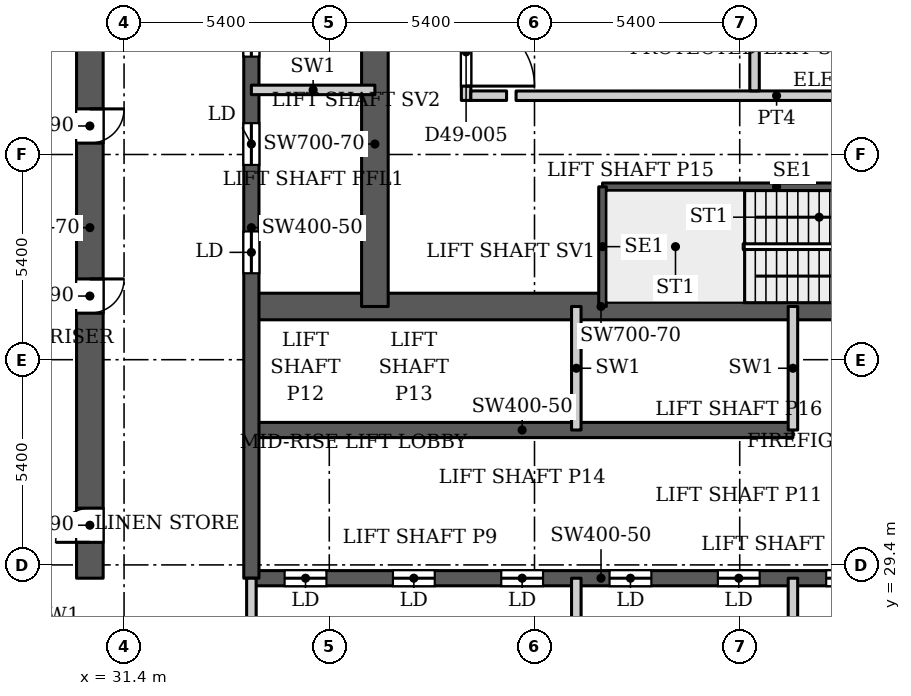
"""IFC4 building model, lengths in metres.
Left out: names, types, materials, properties, quantities, classifications, styles, units other than length and angle.
Written with IfcOpenShell. Run it as: python <this file> out.ifc"""

import sys

from ifc_helpers import new_model, si_unit, direction, frame, frame_2d, origin, place, context, subcontext, project, spatial, rectangle, extrude, source, transform, mapped, element, fill, save


model = new_model("IFC4")
c1 = context("Model", 3, precision=1e-05, world=origin(), true_north=direction((0.0, 1.0)))
c2 = subcontext(c1, "Body", "Model", "MODEL_VIEW")
j1 = project(units=[si_unit("LENGTHUNIT", "METRE"), si_unit("PLANEANGLEUNIT", "RADIAN")], contexts=[c1])
p1 = place(None, origin())
s1 = spatial("IfcSite", under=j1, at=p1, CompositionType="ELEMENT")
p2 = place(p1, origin())
s2 = spatial("IfcBuilding", under=s1, at=p2, CompositionType="ELEMENT")
p3 = place(p2, frame((0.0, 0.0, 211.1)))
s3 = spatial("IfcBuildingStorey", under=s2, at=p3, CompositionType="ELEMENT", Elevation=211.1)
p4 = place(p3, frame((34.75, 29.05, 0.0), z_axis=(0.0, 0.0, 1.0), x_axis=(1.0, 0.0, 0.0)))
e1 = element("IfcWall", 1, at=p4, inside=s3, PredefinedType="SHEAR", context=c2, shape_type="SweptSolid", body=[
    extrude(rectangle(XDim=18.4, YDim=0.4, at=frame_2d((9.2, 0.0))), origin(), (0.0, 0.0, 1.0), 5.1),
])
p5 = place(p4, frame((0.875, 0.0, 0.0)))
e2 = element("IfcOpeningElement", 2, at=p5, cuts=e1, PredefinedType="OPENING", context=c2, shape_type="SweptSolid", body=[
    extrude(rectangle(XDim=1.1, YDim=2.2, at=frame_2d((0.55, 1.1))), frame((0.0, 0.21, 0.0), z_axis=(0.0, -1.0, 0.0), x_axis=(1.0, 0.0, 0.0)), (0.0, 0.0, 1.0), 0.42),
])
p6 = place(p4, frame((3.725, 0.0, 0.0)))
e3 = element("IfcOpeningElement", 3, at=p6, cuts=e1, PredefinedType="OPENING", context=c2, shape_type="SweptSolid", body=[
    extrude(rectangle(XDim=1.1, YDim=2.2, at=frame_2d((0.55, 1.1))), frame((0.0, 0.21, 0.0), z_axis=(0.0, -1.0, 0.0), x_axis=(1.0, 0.0, 0.0)), (0.0, 0.0, 1.0), 0.42),
])
p7 = place(p4, frame((6.575, 0.0, 0.0)))
e4 = element("IfcOpeningElement", 4, at=p7, cuts=e1, PredefinedType="OPENING", context=c2, shape_type="SweptSolid", body=[
    extrude(rectangle(XDim=1.1, YDim=2.2, at=frame_2d((0.55, 1.1))), frame((0.0, 0.21, 0.0), z_axis=(0.0, -1.0, 0.0), x_axis=(1.0, 0.0, 0.0)), (0.0, 0.0, 1.0), 0.42),
])
p8 = place(p4, frame((9.425, 0.0, 0.0)))
e5 = element("IfcOpeningElement", 5, at=p8, cuts=e1, PredefinedType="OPENING", context=c2, shape_type="SweptSolid", body=[
    extrude(rectangle(XDim=1.1, YDim=2.2, at=frame_2d((0.55, 1.1))), frame((0.0, 0.21, 0.0), z_axis=(0.0, -1.0, 0.0), x_axis=(1.0, 0.0, 0.0)), (0.0, 0.0, 1.0), 0.42),
])
p9 = place(p4, frame((12.275, 0.0, 0.0)))
e6 = element("IfcOpeningElement", 6, at=p9, cuts=e1, PredefinedType="OPENING", context=c2, shape_type="SweptSolid", body=[
    extrude(rectangle(XDim=1.1, YDim=2.2, at=frame_2d((0.55, 1.1))), frame((0.0, 0.21, 0.0), z_axis=(0.0, -1.0, 0.0), x_axis=(1.0, 0.0, 0.0)), (0.0, 0.0, 1.0), 0.42),
])
p10 = place(p4, frame((15.125, 0.0, 0.0)))
e7 = element("IfcOpeningElement", 7, at=p10, cuts=e1, PredefinedType="OPENING", context=c2, shape_type="SweptSolid", body=[
    extrude(rectangle(XDim=1.1, YDim=2.2, at=frame_2d((0.55, 1.1))), frame((0.0, 0.21, 0.0), z_axis=(0.0, -1.0, 0.0), x_axis=(1.0, 0.0, 0.0)), (0.0, 0.0, 1.0), 0.42),
])
p11 = place(p3, frame((34.75, 32.95, 0.0), z_axis=(0.0, 0.0, 1.0), x_axis=(1.0, 0.0, 0.0)))
e8 = element("IfcWall", 8, at=p11, inside=s3, PredefinedType="SHEAR", context=c2, shape_type="SweptSolid", body=[
    extrude(rectangle(XDim=14.25, YDim=0.4, at=frame_2d((7.125, 0.0))), origin(), (0.0, 0.0, 1.0), 5.1),
])
p12 = place(p3, frame((34.75, 36.2, 0.0), z_axis=(0.0, 0.0, 1.0), x_axis=(1.0, 0.0, 0.0)))
e9 = element("IfcWall", 9, at=p12, inside=s3, PredefinedType="SHEAR", context=c2, shape_type="SweptSolid", body=[
    extrude(rectangle(XDim=18.4, YDim=0.7, at=frame_2d((9.2, 0.0))), origin(), (0.0, 0.0, 1.0), 5.1),
])
p13 = place(p12, frame((16.9, 0.0, 0.0)))
e10 = element("IfcOpeningElement", 10, at=p13, cuts=e9, PredefinedType="OPENING", context=c2, shape_type="SweptSolid", body=[
    extrude(rectangle(XDim=1.0, YDim=2.2, at=frame_2d((0.5, 1.1))), frame((0.0, 0.36, 0.0), z_axis=(0.0, -1.0, 0.0), x_axis=(1.0, 0.0, 0.0)), (0.0, 0.0, 1.0), 0.72),
])
p14 = place(p3, frame((34.75, 29.05, 0.0), z_axis=(0.0, 0.0, 1.0), x_axis=(0.0, 1.0, 0.0)))
e11 = element("IfcWall", 11, at=p14, inside=s3, PredefinedType="SHEAR", context=c2, shape_type="SweptSolid", body=[
    extrude(rectangle(XDim=18.45, YDim=0.4, at=frame_2d((9.225, 0.0))), origin(), (0.0, 0.0, 1.0), 5.1),
])
p15 = place(p14, frame((8.025, 0.0, 0.0)))
e12 = element("IfcOpeningElement", 12, at=p15, cuts=e11, PredefinedType="OPENING", context=c2, shape_type="SweptSolid", body=[
    extrude(rectangle(XDim=1.1, YDim=2.2, at=frame_2d((0.55, 1.1))), frame((0.0, 0.21, 0.0), z_axis=(0.0, -1.0, 0.0), x_axis=(1.0, 0.0, 0.0)), (0.0, 0.0, 1.0), 0.42),
])
p16 = place(p14, frame((10.875, 0.0, 0.0)))
e13 = element("IfcOpeningElement", 13, at=p16, cuts=e11, PredefinedType="OPENING", context=c2, shape_type="SweptSolid", body=[
    extrude(rectangle(XDim=1.1, YDim=2.2, at=frame_2d((0.55, 1.1))), frame((0.0, 0.21, 0.0), z_axis=(0.0, -1.0, 0.0), x_axis=(1.0, 0.0, 0.0)), (0.0, 0.0, 1.0), 0.42),
])
p17 = place(p14, frame((13.725, 0.0, 0.0)))
e14 = element("IfcOpeningElement", 14, at=p17, cuts=e11, PredefinedType="OPENING", context=c2, shape_type="SweptSolid", body=[
    extrude(rectangle(XDim=1.1, YDim=2.2, at=frame_2d((0.55, 1.1))), frame((0.0, 0.21, 0.0), z_axis=(0.0, -1.0, 0.0), x_axis=(1.0, 0.0, 0.0)), (0.0, 0.0, 1.0), 0.42),
])
p18 = place(p14, frame((15.95, 0.0, 0.0)))
e15 = element("IfcOpeningElement", 15, at=p18, cuts=e11, PredefinedType="OPENING", context=c2, shape_type="SweptSolid", body=[
    extrude(rectangle(XDim=1.1, YDim=2.2, at=frame_2d((0.55, 1.1))), frame((0.0, 0.21, 0.0), z_axis=(0.0, -1.0, 0.0), x_axis=(1.0, 0.0, 0.0)), (0.0, 0.0, 1.0), 0.42),
])
p19 = place(p3, frame((38.0, 36.2, 0.0), z_axis=(0.0, 0.0, 1.0), x_axis=(0.0, 1.0, 0.0)))
e16 = element("IfcWall", 16, at=p19, inside=s3, PredefinedType="SHEAR", context=c2, shape_type="SweptSolid", body=[
    extrude(rectangle(XDim=8.55, YDim=0.7, at=frame_2d((4.275, 0.0))), origin(), (0.0, 0.0, 1.0), 5.1),
])
p20 = place(p3, frame((30.5, 29.05, 0.0), z_axis=(0.0, 0.0, 1.0), x_axis=(0.0, 1.0, 0.0)))
e17 = element("IfcWall", 17, at=p20, inside=s3, PredefinedType="SHEAR", context=c2, shape_type="SweptSolid", body=[
    extrude(rectangle(XDim=18.45, YDim=0.7, at=frame_2d((9.225, 0.0))), origin(), (0.0, 0.0, 1.0), 5.1),
])
p21 = place(p20, frame((0.944, 0.0, 0.0)))
e18 = element("IfcOpeningElement", 18, at=p21, cuts=e17, PredefinedType="OPENING", context=c2, shape_type="SweptSolid", body=[
    extrude(rectangle(XDim=0.9, YDim=2.2, at=frame_2d((0.45, 1.1))), frame((0.0, 0.36, 0.0), z_axis=(0.0, -1.0, 0.0), x_axis=(1.0, 0.0, 0.0)), (0.0, 0.0, 1.0), 0.72),
])
p22 = place(p20, frame((6.975, 0.0, 0.0)))
e19 = element("IfcOpeningElement", 19, at=p22, cuts=e17, PredefinedType="OPENING", context=c2, shape_type="SweptSolid", body=[
    extrude(rectangle(XDim=0.9, YDim=2.2, at=frame_2d((0.45, 1.1))), frame((0.0, 0.36, 0.0), z_axis=(0.0, -1.0, 0.0), x_axis=(1.0, 0.0, 0.0)), (0.0, 0.0, 1.0), 0.72),
])
p23 = place(p20, frame((11.45, 0.0, 0.0)))
e20 = element("IfcOpeningElement", 20, at=p23, cuts=e17, PredefinedType="OPENING", context=c2, shape_type="SweptSolid", body=[
    extrude(rectangle(XDim=0.9, YDim=2.2, at=frame_2d((0.45, 1.1))), frame((0.0, 0.36, 0.0), z_axis=(0.0, -1.0, 0.0), x_axis=(1.0, 0.0, 0.0)), (0.0, 0.0, 1.0), 0.72),
])
p24 = place(p3, frame((29.712, 26.072, 0.0), z_axis=(0.0, 0.0, 1.0), x_axis=(-0.511028049012, 0.859564036662, 0.0)))
e21 = element("IfcWall", 21, at=p24, inside=s3, PredefinedType="SOLIDWALL", context=c2, shape_type="SweptSolid", body=[
    extrude(rectangle(XDim=4.634, YDim=0.25, at=frame_2d((2.317, 0.0))), origin(), (0.0, 0.0, 1.0), 4.417),
])
p25 = place(p3, frame((27.195, 31.969, 0.0), z_axis=(0.0, 0.0, 1.0), x_axis=(0.052556141556, 0.99861797099, 0.0)))
e22 = element("IfcWall", 22, at=p25, inside=s3, PredefinedType="SOLIDWALL", context=c2, shape_type="SweptSolid", body=[
    extrude(rectangle(XDim=66.651, YDim=0.25, at=frame_2d((33.326, 0.0))), origin(), (0.0, 0.0, 1.0), 4.95),
])
p26 = place(p3, frame((43.99, 39.35, 0.0), z_axis=(0.0, 0.0, 1.0), x_axis=(1.0, 0.0, 0.0)))
e23 = element("IfcWall", 23, at=p26, inside=s3, PredefinedType="SHEAR", context=c2, shape_type="SweptSolid", body=[
    extrude(rectangle(XDim=9.16, YDim=0.2, at=frame_2d((4.58, 0.0))), origin(), (0.0, 0.0, 1.0), 5.1),
])
p27 = place(p3, frame((43.99, 36.2, 0.0), z_axis=(0.0, 0.0, 1.0), x_axis=(0.0, 1.0, 0.0)))
e24 = element("IfcWall", 24, at=p27, inside=s3, PredefinedType="SHEAR", context=c2, shape_type="SweptSolid", body=[
    extrude(rectangle(XDim=3.15, YDim=0.2, at=frame_2d((1.575, 0.0))), origin(), (0.0, 0.0, 1.0), 5.1),
])
for number, where, z_axis, x_axis in (
    (25, (34.75, 25.8, 0.0), (0.0, 0.0, 1.0), (0.0, 1.0, 0.0)),
    (26, (43.3, 25.8, 0.0), (0.0, 0.0, 1.0), (0.0, 1.0, 0.0)),
    (27, (43.3, 32.95, 0.0), (0.0, 0.0, 1.0), (0.0, 1.0, 0.0)),
    (28, (49.0, 25.8, 0.0), (0.0, 0.0, 1.0), (0.0, 1.0, 0.0)),
    (29, (49.0, 32.95, 0.0), (0.0, 0.0, 1.0), (0.0, 1.0, 0.0)),
    (30, (34.75, 41.9, 0.0), (0.0, 0.0, 1.0), (1.0, 0.0, 0.0)),
):
    element("IfcWall", number, at=place(p3, frame(where, z_axis=z_axis, x_axis=x_axis)), inside=s3, PredefinedType="PARTITIONING", context=c2, shape_type="SweptSolid", body=[
        extrude(rectangle(XDim=3.25, YDim=0.25, at=frame_2d((1.625, 0.0))), origin(), (0.0, 0.0, 1.0), 5.1),
    ])
p28 = place(p3, frame((40.4, 41.623, 0.0), z_axis=(0.0, 0.0, 1.0), x_axis=(0.0, 1.0, 0.0)))
e31 = element("IfcWall", 31, at=p28, inside=s3, PredefinedType="PARTITIONING", context=c2, shape_type="SweptSolid", body=[
    extrude(rectangle(XDim=5.527, YDim=0.25, at=frame_2d((2.763, 0.0))), origin(), (0.0, 0.0, 1.0), 4.8),
])
p29 = place(p28, frame((0.377, 0.0, 0.0)))
e32 = element("IfcOpeningElement", 32, at=p29, cuts=e31, PredefinedType="OPENING", context=c2, shape_type="SweptSolid", body=[
    extrude(rectangle(XDim=1.8, YDim=2.1, at=frame_2d((0.9, 1.05))), frame((0.0, 0.135, 0.0), z_axis=(0.0, -1.0, 0.0), x_axis=(1.0, 0.0, 0.0)), (0.0, 0.0, 1.0), 0.27),
])
p30 = place(p3, frame((40.525, 41.748, 0.0), z_axis=(0.0, 0.0, 1.0), x_axis=(1.0, 0.0, 0.0)))
e33 = element("IfcWall", 33, at=p30, inside=s3, PredefinedType="PARTITIONING", context=c2, shape_type="SweptSolid", body=[
    extrude(rectangle(XDim=0.94, YDim=0.25, at=frame_2d((0.47, 0.0))), origin(), (0.0, 0.0, 1.0), 4.8),
])
p31 = place(p3, frame((41.715, 41.746, 0.0), z_axis=(0.0, 0.0, 1.0), x_axis=(0.999999989853, 0.000142460288, 0.0)))
e34 = element("IfcWall", 34, at=p31, inside=s3, PredefinedType="PARTITIONING", context=c2, shape_type="SweptSolid", body=[
    extrude(rectangle(XDim=13.71, YDim=0.25, at=frame_2d((6.855, 0.0))), origin(), (0.0, 0.0, 1.0), 4.8),
])
p32 = place(p3, frame((47.99, 41.875, 0.0), z_axis=(0.0, 0.0, 1.0), x_axis=(0.0, 1.0, 0.0)))
e35 = element("IfcWall", 35, at=p32, inside=s3, PredefinedType="PARTITIONING", context=c2, shape_type="SweptSolid", body=[
    extrude(rectangle(XDim=3.901, YDim=0.25, at=frame_2d((1.95, 0.0))), origin(), (0.0, 0.0, 1.0), 4.8),
])
m1 = source(origin(), c2, "Body", "SweptSolid", [
    extrude(rectangle(XDim=1.1, YDim=2.2, at=frame_2d((0.55, 1.1))), frame((0.0, 0.025, 0.0), z_axis=(0.0, -1.0, 0.0), x_axis=(1.0, 0.0, 0.0)), (0.0, 0.0, 1.0), 0.05),
])
p33 = place(p5, origin())
e36 = element("IfcDoor", 36, at=p33, inside=s3, OperationType="SLIDING_TO_LEFT", PredefinedType="DOOR", context=c2, shape_type="MappedRepresentation", body=[
    mapped(m1, transform((0.0, 0.0, 0.0), x_axis=(1.0, 0.0, 0.0), y_axis=(0.0, 1.0, 0.0), z_axis=(0.0, 0.0, 1.0), scale=1.0)),
])
fill(e2, e36)
p34 = place(p6, origin())
e37 = element("IfcDoor", 37, at=p34, inside=s3, OperationType="SLIDING_TO_LEFT", PredefinedType="DOOR", context=c2, shape_type="MappedRepresentation", body=[
    mapped(m1, transform((0.0, 0.0, 0.0), x_axis=(1.0, 0.0, 0.0), y_axis=(0.0, 1.0, 0.0), z_axis=(0.0, 0.0, 1.0), scale=1.0)),
])
fill(e3, e37)
p35 = place(p7, origin())
e38 = element("IfcDoor", 38, at=p35, inside=s3, OperationType="SLIDING_TO_LEFT", PredefinedType="DOOR", context=c2, shape_type="MappedRepresentation", body=[
    mapped(m1, transform((0.0, 0.0, 0.0), x_axis=(1.0, 0.0, 0.0), y_axis=(0.0, 1.0, 0.0), z_axis=(0.0, 0.0, 1.0), scale=1.0)),
])
fill(e4, e38)
p36 = place(p8, origin())
e39 = element("IfcDoor", 39, at=p36, inside=s3, OperationType="SLIDING_TO_LEFT", PredefinedType="DOOR", context=c2, shape_type="MappedRepresentation", body=[
    mapped(m1, transform((0.0, 0.0, 0.0), x_axis=(1.0, 0.0, 0.0), y_axis=(0.0, 1.0, 0.0), z_axis=(0.0, 0.0, 1.0), scale=1.0)),
])
fill(e5, e39)
p37 = place(p9, origin())
e40 = element("IfcDoor", 40, at=p37, inside=s3, OperationType="SLIDING_TO_LEFT", PredefinedType="DOOR", context=c2, shape_type="MappedRepresentation", body=[
    mapped(m1, transform((0.0, 0.0, 0.0), x_axis=(1.0, 0.0, 0.0), y_axis=(0.0, 1.0, 0.0), z_axis=(0.0, 0.0, 1.0), scale=1.0)),
])
fill(e6, e40)
p38 = place(p15, origin())
e41 = element("IfcDoor", 41, at=p38, inside=s3, OperationType="SLIDING_TO_LEFT", PredefinedType="DOOR", context=c2, shape_type="MappedRepresentation", body=[
    mapped(m1, transform((0.0, 0.0, 0.0), x_axis=(1.0, 0.0, 0.0), y_axis=(0.0, 1.0, 0.0), z_axis=(0.0, 0.0, 1.0), scale=1.0)),
])
fill(e12, e41)
p39 = place(p16, origin())
e42 = element("IfcDoor", 42, at=p39, inside=s3, OperationType="SLIDING_TO_LEFT", PredefinedType="DOOR", context=c2, shape_type="MappedRepresentation", body=[
    mapped(m1, transform((0.0, 0.0, 0.0), x_axis=(1.0, 0.0, 0.0), y_axis=(0.0, 1.0, 0.0), z_axis=(0.0, 0.0, 1.0), scale=1.0)),
])
fill(e13, e42)
p40 = place(p17, origin())
e43 = element("IfcDoor", 43, at=p40, inside=s3, OperationType="SLIDING_TO_LEFT", PredefinedType="DOOR", context=c2, shape_type="MappedRepresentation", body=[
    mapped(m1, transform((0.0, 0.0, 0.0), x_axis=(1.0, 0.0, 0.0), y_axis=(0.0, 1.0, 0.0), z_axis=(0.0, 0.0, 1.0), scale=1.0)),
])
fill(e14, e43)
p41 = place(p10, origin())
e44 = element("IfcDoor", 44, at=p41, inside=s3, OperationType="SLIDING_TO_LEFT", PredefinedType="DOOR", context=c2, shape_type="MappedRepresentation", body=[
    mapped(m1, transform((0.0, 0.0, 0.0), x_axis=(1.0, 0.0, 0.0), y_axis=(0.0, 1.0, 0.0), z_axis=(0.0, 0.0, 1.0), scale=1.0)),
])
fill(e7, e44)
m2 = source(origin(), c2, "Body", "SweptSolid", [
    extrude(rectangle(XDim=0.9, YDim=2.2, at=frame_2d((0.45, 1.1))), frame((0.0, 0.025, 0.0), z_axis=(0.0, -1.0, 0.0), x_axis=(1.0, 0.0, 0.0)), (0.0, 0.0, 1.0), 0.05),
])
p42 = place(p21, origin())
e45 = element("IfcDoor", 45, at=p42, inside=s3, OperationType="SINGLE_SWING_LEFT", PredefinedType="DOOR", context=c2, shape_type="MappedRepresentation", body=[
    mapped(m2, transform((0.0, 0.0, 0.0), x_axis=(1.0, 0.0, 0.0), y_axis=(0.0, 1.0, 0.0), z_axis=(0.0, 0.0, 1.0), scale=1.0)),
])
fill(e18, e45)
p43 = place(p22, origin())
e46 = element("IfcDoor", 46, at=p43, inside=s3, OperationType="SINGLE_SWING_RIGHT", PredefinedType="DOOR", context=c2, shape_type="MappedRepresentation", body=[
    mapped(m2, transform((0.0, 0.0, 0.0), x_axis=(1.0, 0.0, 0.0), y_axis=(0.0, 1.0, 0.0), z_axis=(0.0, 0.0, 1.0), scale=1.0)),
])
fill(e19, e46)
p44 = place(p23, origin())
e47 = element("IfcDoor", 47, at=p44, inside=s3, OperationType="SINGLE_SWING_RIGHT", PredefinedType="DOOR", context=c2, shape_type="MappedRepresentation", body=[
    mapped(m2, transform((0.0, 0.0, 0.0), x_axis=(1.0, 0.0, 0.0), y_axis=(0.0, 1.0, 0.0), z_axis=(0.0, 0.0, 1.0), scale=1.0)),
])
fill(e20, e47)
m3 = source(origin(), c2, "Body", "SweptSolid", [
    extrude(rectangle(XDim=1.8, YDim=2.1, at=frame_2d((0.9, 1.05))), frame((0.0, 0.025, 0.0), z_axis=(0.0, -1.0, 0.0), x_axis=(1.0, 0.0, 0.0)), (0.0, 0.0, 1.0), 0.05),
])
p45 = place(p29, origin())
e48 = element("IfcDoor", 48, at=p45, inside=s3, OperationType="DOUBLE_DOOR_SINGLE_SWING", PredefinedType="DOOR", context=c2, shape_type="MappedRepresentation", body=[
    mapped(m3, transform((0.0, 0.0, 0.0), x_axis=(1.0, 0.0, 0.0), y_axis=(0.0, 1.0, 0.0), z_axis=(0.0, 0.0, 1.0), scale=1.0)),
])
fill(e32, e48)
save(model, sys.argv[1])
